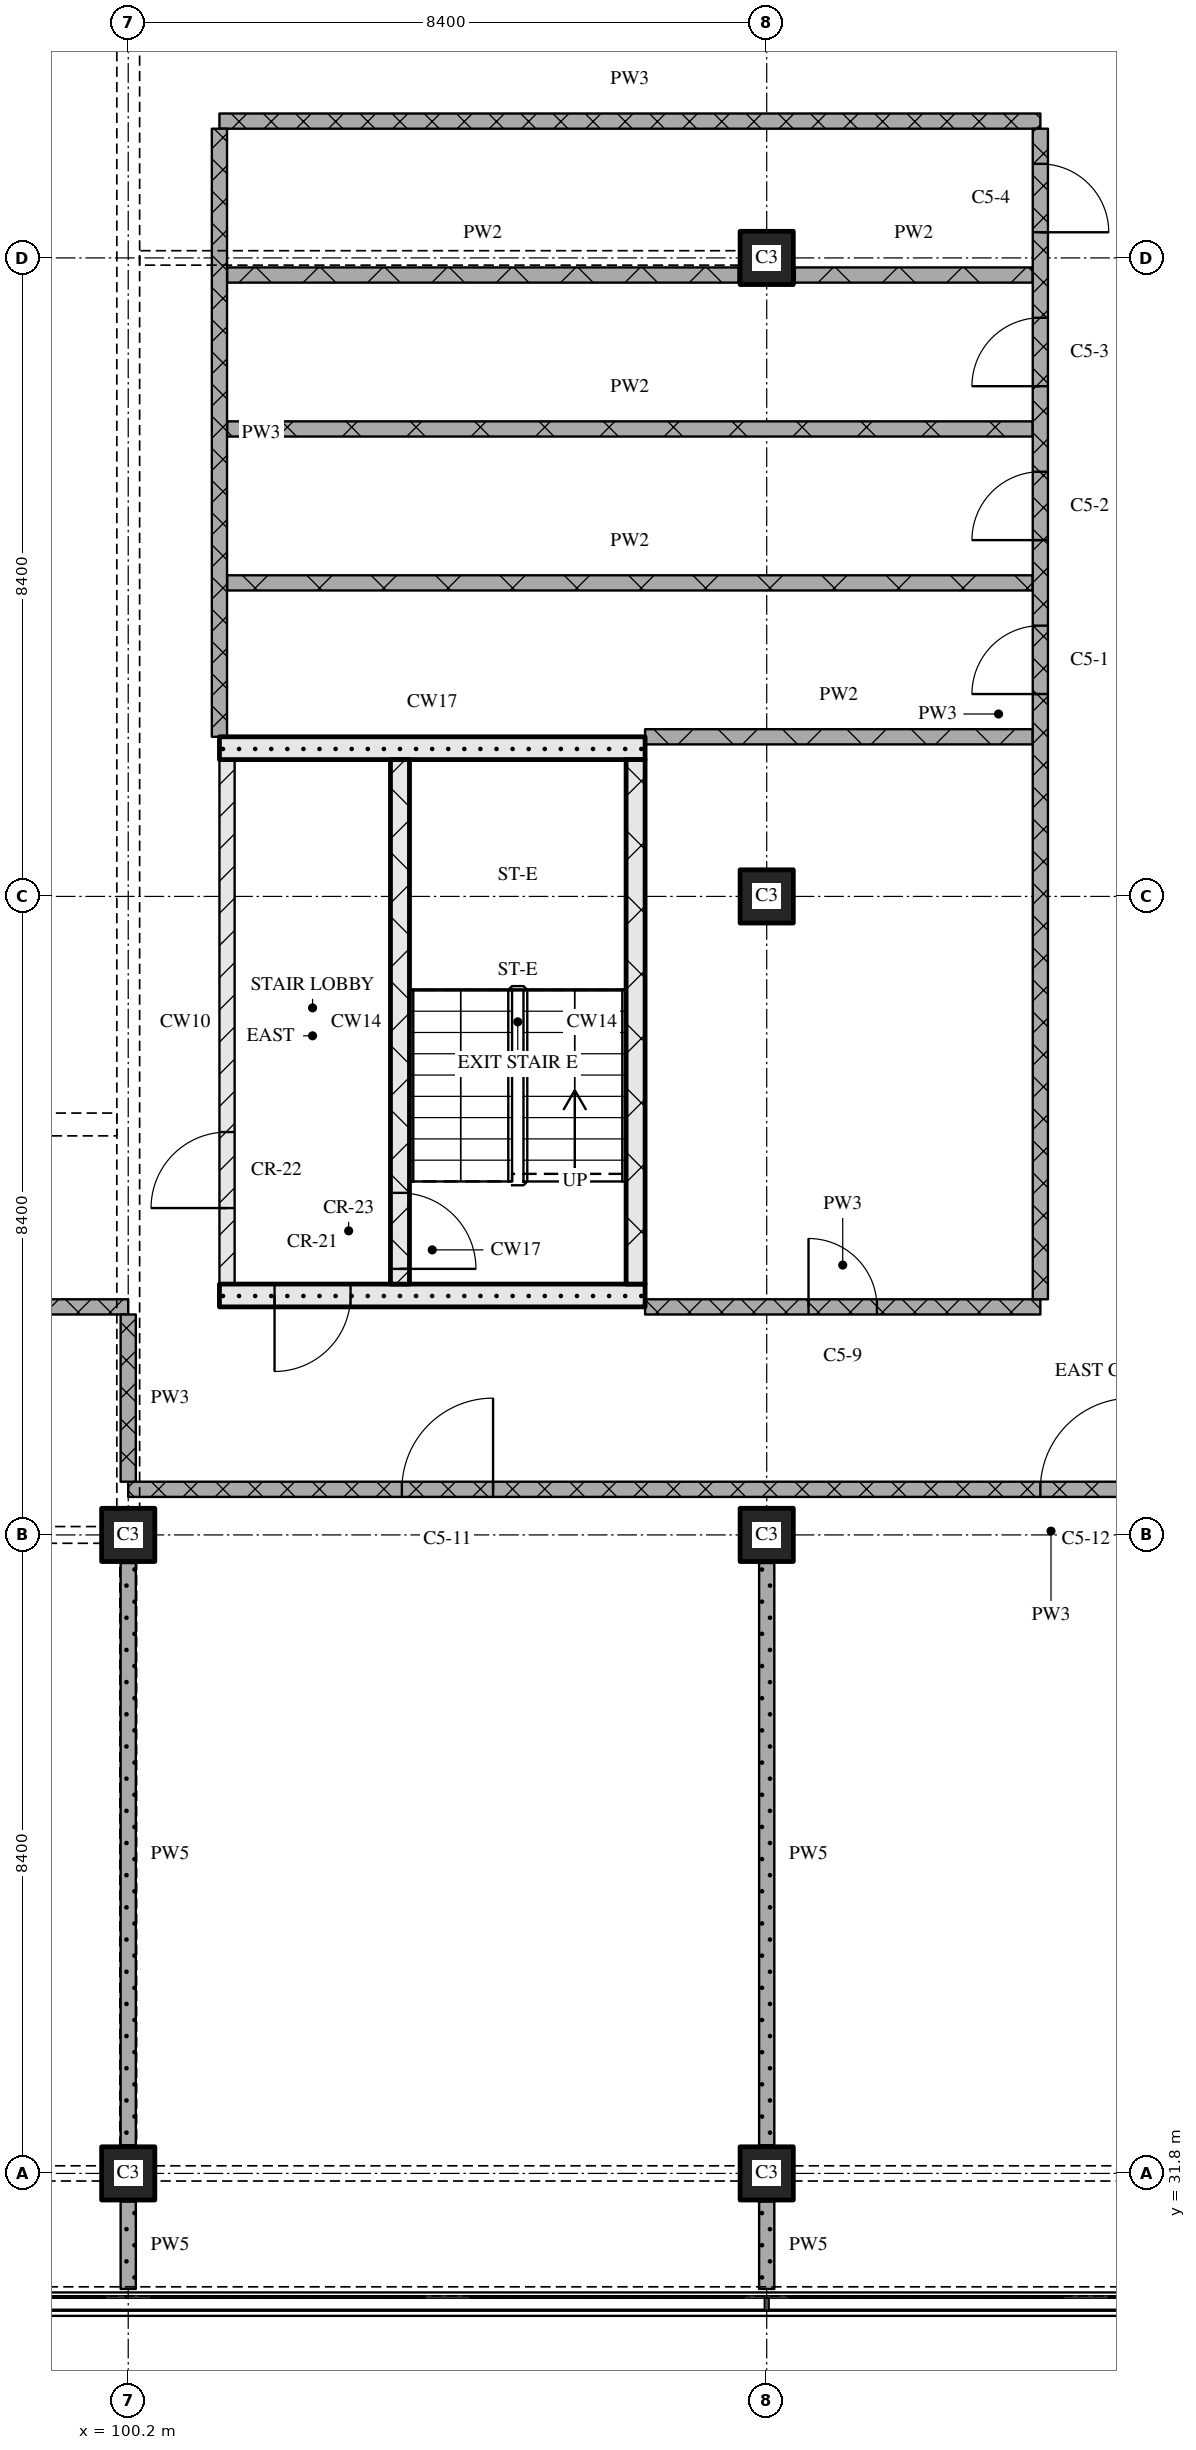
"""IFC4 building model, lengths in metres.
Left out: names, types, materials, properties, quantities, classifications, styles, units other than length and angle.
Written with IfcOpenShell. Run it as: python <this file> out.ifc"""

import sys

from ifc_helpers import new_model, si_unit, direction, frame, frame_2d, origin, origin_2d, place, context, subcontext, project, spatial, rectangle, extrude, element, fill, save


model = new_model("IFC4")
c1 = context("Model", 3, precision=1e-05, world=origin(), true_north=direction((0.0, 1.0)))
c2 = subcontext(c1, "Body", "Model", "MODEL_VIEW")
j1 = project(units=[si_unit("LENGTHUNIT", "METRE"), si_unit("PLANEANGLEUNIT", "RADIAN")], contexts=[c1])
p1 = place(None, origin())
s1 = spatial("IfcSite", under=j1, at=p1, CompositionType="ELEMENT")
p2 = place(p1, origin())
s2 = spatial("IfcBuilding", under=s1, at=p2, CompositionType="ELEMENT")
p3 = place(p2, frame((0.0, 0.0, 190.65)))
s3 = spatial("IfcBuildingStorey", under=s2, at=p3, CompositionType="ELEMENT", Elevation=190.65)
for number, where, z_axis, x_axis in (
    (1, (100.2, 31.8, 0.0), (0.0, 0.0, 1.0), (1.0, 0.0, 0.0)),
    (2, (100.2, 40.2, 0.0), (0.0, 0.0, 1.0), (1.0, 0.0, 0.0)),
    (3, (108.6, 31.8, 0.0), (0.0, 0.0, 1.0), (1.0, 0.0, 0.0)),
    (4, (108.6, 40.2, 0.0), (0.0, 0.0, 1.0), (1.0, 0.0, 0.0)),
    (5, (108.6, 48.6, 0.0), (0.0, 0.0, 1.0), (1.0, 0.0, 0.0)),
    (6, (108.6, 57.0, 0.0), (0.0, 0.0, 1.0), (1.0, 0.0, 0.0)),
):
    element("IfcColumn", number, at=place(p3, frame(where, z_axis=z_axis, x_axis=x_axis)), inside=s3, PredefinedType="COLUMN", context=c2, shape_type="SweptSolid", body=[
        extrude(rectangle(XDim=0.7, YDim=0.7, at=origin_2d()), origin(), (0.0, 0.0, 1.0), 3.6),
    ])
p4 = place(p3, frame((101.4, 43.35, 0.0), z_axis=(0.0, 0.0, 1.0), x_axis=(1.0, 0.0, 0.0)))
e7 = element("IfcWall", 7, at=p4, inside=s3, PredefinedType="SOLIDWALL", context=c2, shape_type="SweptSolid", body=[
    extrude(rectangle(XDim=5.6, YDim=0.3, at=frame_2d((2.8, 0.0))), origin(), (0.0, 0.0, 1.0), 3.3),
])
p5 = place(p4, frame((0.725, 0.0, 0.0)))
e8 = element("IfcOpeningElement", 8, at=p5, cuts=e7, PredefinedType="OPENING", context=c2, shape_type="SweptSolid", body=[
    extrude(rectangle(XDim=1.0, YDim=2.1, at=frame_2d((0.5, 1.05))), frame((0.0, 0.16, 0.0), z_axis=(0.0, -1.0, 0.0), x_axis=(1.0, 0.0, 0.0)), (0.0, 0.0, 1.0), 0.32),
])
p6 = place(p3, frame((101.5, 43.5, 0.0), z_axis=(0.0, 0.0, 1.0), x_axis=(0.0, 1.0, 0.0)))
e9 = element("IfcWall", 9, at=p6, inside=s3, PredefinedType="PARTITIONING", context=c2, shape_type="SweptSolid", body=[
    extrude(rectangle(XDim=6.9, YDim=0.2, at=frame_2d((3.45, 0.0))), origin(), (0.0, 0.0, 1.0), 3.3),
])
p7 = place(p6, frame((1.0, 0.0, 0.0)))
e10 = element("IfcOpeningElement", 10, at=p7, cuts=e9, PredefinedType="OPENING", context=c2, shape_type="SweptSolid", body=[
    extrude(rectangle(XDim=1.0, YDim=2.1, at=frame_2d((0.5, 1.05))), frame((0.0, 0.11, 0.0), z_axis=(0.0, -1.0, 0.0), x_axis=(1.0, 0.0, 0.0)), (0.0, 0.0, 1.0), 0.22),
])
p8 = place(p3, frame((103.775, 43.5, 0.0), z_axis=(0.0, 0.0, 1.0), x_axis=(0.0, 1.0, 0.0)))
e11 = element("IfcWall", 11, at=p8, inside=s3, PredefinedType="SOLIDWALL", context=c2, shape_type="SweptSolid", body=[
    extrude(rectangle(XDim=6.9, YDim=0.25, at=frame_2d((3.45, 0.0))), origin(), (0.0, 0.0, 1.0), 3.3),
])
p9 = place(p8, frame((0.2, 0.0, 0.0)))
e12 = element("IfcOpeningElement", 12, at=p9, cuts=e11, PredefinedType="OPENING", context=c2, shape_type="SweptSolid", body=[
    extrude(rectangle(XDim=1.0, YDim=2.1, at=frame_2d((0.5, 1.05))), frame((0.0, 0.135, 0.0), z_axis=(0.0, -1.0, 0.0), x_axis=(1.0, 0.0, 0.0)), (0.0, 0.0, 1.0), 0.27),
])
p10 = place(p3, frame((106.875, 43.5, 0.0), z_axis=(0.0, 0.0, 1.0), x_axis=(0.0, 1.0, 0.0)))
e13 = element("IfcWall", 13, at=p10, inside=s3, PredefinedType="SOLIDWALL", context=c2, shape_type="SweptSolid", body=[
    extrude(rectangle(XDim=6.9, YDim=0.25, at=frame_2d((3.45, 0.0))), origin(), (0.0, 0.0, 1.0), 3.3),
])
p11 = place(p3, frame((101.4, 50.55, 0.0), z_axis=(0.0, 0.0, 1.0), x_axis=(1.0, 0.0, 0.0)))
e14 = element("IfcWall", 14, at=p11, inside=s3, PredefinedType="SOLIDWALL", context=c2, shape_type="SweptSolid", body=[
    extrude(rectangle(XDim=5.6, YDim=0.3, at=frame_2d((2.8, 0.0))), origin(), (0.0, 0.0, 1.0), 3.3),
])
p12 = place(p3, frame((124.48, 40.8, 0.0), z_axis=(0.0, 0.0, 1.0), x_axis=(-1.0, 0.0, 0.0)))
e15 = element("IfcWall", 15, at=p12, inside=s3, PredefinedType="PARTITIONING", context=c2, shape_type="SweptSolid", body=[
    extrude(rectangle(XDim=24.28, YDim=0.2, at=frame_2d((12.14, 0.0))), origin(), (0.0, 0.0, 1.0), 3.3),
])
p13 = place(p12, frame((2.352, 0.0, 0.0)))
e16 = element("IfcOpeningElement", 16, at=p13, cuts=e15, PredefinedType="OPENING", context=c2, shape_type="SweptSolid", body=[
    extrude(rectangle(XDim=1.2, YDim=2.1, at=frame_2d((0.6, 1.05))), frame((0.0, 0.11, 0.0), z_axis=(0.0, -1.0, 0.0), x_axis=(1.0, 0.0, 0.0)), (0.0, 0.0, 1.0), 0.22),
])
p14 = place(p12, frame((11.08, 0.0, 0.0)))
e17 = element("IfcOpeningElement", 17, at=p14, cuts=e15, PredefinedType="OPENING", context=c2, shape_type="SweptSolid", body=[
    extrude(rectangle(XDim=1.2, YDim=2.1, at=frame_2d((0.6, 1.05))), frame((0.0, 0.11, 0.0), z_axis=(0.0, -1.0, 0.0), x_axis=(1.0, 0.0, 0.0)), (0.0, 0.0, 1.0), 0.22),
])
p15 = place(p12, frame((19.48, 0.0, 0.0)))
e18 = element("IfcOpeningElement", 18, at=p15, cuts=e15, PredefinedType="OPENING", context=c2, shape_type="SweptSolid", body=[
    extrude(rectangle(XDim=1.2, YDim=2.1, at=frame_2d((0.6, 1.05))), frame((0.0, 0.11, 0.0), z_axis=(0.0, -1.0, 0.0), x_axis=(1.0, 0.0, 0.0)), (0.0, 0.0, 1.0), 0.22),
])
p16 = place(p3, frame((100.2, 43.2, 0.0), z_axis=(0.0, 0.0, 1.0), x_axis=(-1.0, 0.0, 0.0)))
e19 = element("IfcWall", 19, at=p16, inside=s3, PredefinedType="PARTITIONING", context=c2, shape_type="SweptSolid", body=[
    extrude(rectangle(XDim=25.2, YDim=0.2, at=frame_2d((12.6, 0.0))), origin(), (0.0, 0.0, 1.0), 3.3),
])
p17 = place(p16, frame((3.6, 0.0, 0.0)))
e20 = element("IfcOpeningElement", 20, at=p17, cuts=e19, PredefinedType="OPENING", context=c2, shape_type="SweptSolid", body=[
    extrude(rectangle(XDim=1.2, YDim=2.1, at=frame_2d((0.6, 1.05))), frame((0.0, 0.11, 0.0), z_axis=(0.0, -1.0, 0.0), x_axis=(1.0, 0.0, 0.0)), (0.0, 0.0, 1.0), 0.22),
])
p18 = place(p16, frame((16.2, 0.0, 0.0)))
e21 = element("IfcOpeningElement", 21, at=p18, cuts=e19, PredefinedType="OPENING", context=c2, shape_type="SweptSolid", body=[
    extrude(rectangle(XDim=1.2, YDim=2.1, at=frame_2d((0.6, 1.05))), frame((0.0, 0.11, 0.0), z_axis=(0.0, -1.0, 0.0), x_axis=(1.0, 0.0, 0.0)), (0.0, 0.0, 1.0), 0.22),
])
p19 = place(p3, frame((107.0, 43.2, 0.0), z_axis=(0.0, 0.0, 1.0), x_axis=(1.0, 0.0, 0.0)))
e22 = element("IfcWall", 22, at=p19, inside=s3, PredefinedType="PARTITIONING", context=c2, shape_type="SweptSolid", body=[
    extrude(rectangle(XDim=5.2, YDim=0.2, at=frame_2d((2.6, 0.0))), origin(), (0.0, 0.0, 1.0), 3.3),
])
p20 = place(p19, frame((2.15, 0.0, 0.0)))
e23 = element("IfcOpeningElement", 23, at=p20, cuts=e22, PredefinedType="OPENING", context=c2, shape_type="SweptSolid", body=[
    extrude(rectangle(XDim=0.9, YDim=2.1, at=frame_2d((0.45, 1.05))), frame((0.0, 0.11, 0.0), z_axis=(0.0, -1.0, 0.0), x_axis=(1.0, 0.0, 0.0)), (0.0, 0.0, 1.0), 0.22),
])
p21 = place(p3, frame((107.0, 50.7, 0.0), z_axis=(0.0, 0.0, 1.0), x_axis=(1.0, 0.0, 0.0)))
e24 = element("IfcWall", 24, at=p21, inside=s3, PredefinedType="PARTITIONING", context=c2, shape_type="SweptSolid", body=[
    extrude(rectangle(XDim=5.1, YDim=0.2, at=frame_2d((2.55, 0.0))), origin(), (0.0, 0.0, 1.0), 3.3),
])
for number, where, z_axis, x_axis in (
    (25, (101.5, 52.725, 0.0), (0.0, 0.0, 1.0), (1.0, 0.0, 0.0)),
    (26, (101.5, 54.75, 0.0), (0.0, 0.0, 1.0), (1.0, 0.0, 0.0)),
):
    element("IfcWall", number, at=place(p3, frame(where, z_axis=z_axis, x_axis=x_axis)), inside=s3, PredefinedType="PARTITIONING", context=c2, shape_type="SweptSolid", body=[
        extrude(rectangle(XDim=10.6, YDim=0.2, at=frame_2d((5.3, 0.0))), origin(), (0.0, 0.0, 1.0), 3.3),
    ])
p22 = place(p3, frame((101.5, 56.775, 0.0), z_axis=(0.0, 0.0, 1.0), x_axis=(1.0, 0.0, 0.0)))
e27 = element("IfcWall", 27, at=p22, inside=s3, PredefinedType="PARTITIONING", context=c2, shape_type="SweptSolid", body=[
    extrude(rectangle(XDim=6.73, YDim=0.2, at=frame_2d((3.365, 0.0))), origin(), (0.0, 0.0, 1.0), 3.3),
])
p23 = place(p3, frame((108.97, 56.775, 0.0), z_axis=(0.0, 0.0, 1.0), x_axis=(1.0, 0.0, 0.0)))
e28 = element("IfcWall", 28, at=p23, inside=s3, PredefinedType="PARTITIONING", context=c2, shape_type="SweptSolid", body=[
    extrude(rectangle(XDim=3.13, YDim=0.2, at=frame_2d((1.565, 0.0))), origin(), (0.0, 0.0, 1.0), 3.3),
])
p24 = place(p3, frame((101.4, 58.8, 0.0), z_axis=(0.0, 0.0, 1.0), x_axis=(1.0, 0.0, 0.0)))
e29 = element("IfcWall", 29, at=p24, inside=s3, PredefinedType="PARTITIONING", context=c2, shape_type="SweptSolid", body=[
    extrude(rectangle(XDim=10.8, YDim=0.2, at=frame_2d((5.4, 0.0))), origin(), (0.0, 0.0, 1.0), 3.3),
])
p25 = place(p3, frame((100.2, 43.1, 0.0), z_axis=(0.0, 0.0, 1.0), x_axis=(0.0, -1.0, 0.0)))
e30 = element("IfcWall", 30, at=p25, inside=s3, PredefinedType="PARTITIONING", context=c2, shape_type="SweptSolid", body=[
    extrude(rectangle(XDim=2.2, YDim=0.2, at=frame_2d((1.1, 0.0))), origin(), (0.0, 0.0, 1.0), 2.41),
])
p26 = place(p3, frame((100.2, 31.43, 0.0), z_axis=(0.0, 0.0, 1.0), x_axis=(0.0, -1.0, 0.0)))
e31 = element("IfcWall", 31, at=p26, inside=s3, PredefinedType="PARTITIONING", context=c2, shape_type="SweptSolid", body=[
    extrude(rectangle(XDim=1.15, YDim=0.2, at=frame_2d((0.575, 0.0))), origin(), (0.0, 0.0, 1.0), 2.41),
])
p27 = place(p3, frame((100.2, 39.83, 0.0), z_axis=(0.0, 0.0, 1.0), x_axis=(0.0, -1.0, 0.0)))
e32 = element("IfcWall", 32, at=p27, inside=s3, PredefinedType="PARTITIONING", context=c2, shape_type="SweptSolid", body=[
    extrude(rectangle(XDim=7.66, YDim=0.2, at=frame_2d((3.83, 0.0))), origin(), (0.0, 0.0, 1.0), 2.7),
])
p28 = place(p3, frame((101.4, 58.7, 0.0), z_axis=(0.0, 0.0, 1.0), x_axis=(0.0, -1.0, 0.0)))
e33 = element("IfcWall", 33, at=p28, inside=s3, PredefinedType="PARTITIONING", context=c2, shape_type="SweptSolid", body=[
    extrude(rectangle(XDim=8.0, YDim=0.2, at=frame_2d((4.0, 0.0))), origin(), (0.0, 0.0, 1.0), 3.3),
])
p29 = place(p3, frame((108.6, 31.43, 0.0), z_axis=(0.0, 0.0, 1.0), x_axis=(0.0, -1.0, 0.0)))
e34 = element("IfcWall", 34, at=p29, inside=s3, PredefinedType="PARTITIONING", context=c2, shape_type="SweptSolid", body=[
    extrude(rectangle(XDim=1.15, YDim=0.2, at=frame_2d((0.575, 0.0))), origin(), (0.0, 0.0, 1.0), 3.3),
])
p30 = place(p3, frame((108.6, 39.83, 0.0), z_axis=(0.0, 0.0, 1.0), x_axis=(0.0, -1.0, 0.0)))
e35 = element("IfcWall", 35, at=p30, inside=s3, PredefinedType="PARTITIONING", context=c2, shape_type="SweptSolid", body=[
    extrude(rectangle(XDim=7.66, YDim=0.2, at=frame_2d((3.83, 0.0))), origin(), (0.0, 0.0, 1.0), 3.3),
])
p31 = place(p3, frame((112.2, 43.3, 0.0), z_axis=(0.0, 0.0, 1.0), x_axis=(0.0, 1.0, 0.0)))
e36 = element("IfcWall", 36, at=p31, inside=s3, PredefinedType="PARTITIONING", context=c2, shape_type="SweptSolid", body=[
    extrude(rectangle(XDim=15.4, YDim=0.2, at=frame_2d((7.7, 0.0))), origin(), (0.0, 0.0, 1.0), 3.3),
])
p32 = place(p31, frame((7.962, 0.0, 0.0)))
e37 = element("IfcOpeningElement", 37, at=p32, cuts=e36, PredefinedType="OPENING", context=c2, shape_type="SweptSolid", body=[
    extrude(rectangle(XDim=0.9, YDim=2.1, at=frame_2d((0.45, 1.05))), frame((0.0, 0.11, 0.0), z_axis=(0.0, -1.0, 0.0), x_axis=(1.0, 0.0, 0.0)), (0.0, 0.0, 1.0), 0.22),
])
p33 = place(p31, frame((9.988, 0.0, 0.0)))
e38 = element("IfcOpeningElement", 38, at=p33, cuts=e36, PredefinedType="OPENING", context=c2, shape_type="SweptSolid", body=[
    extrude(rectangle(XDim=0.9, YDim=2.1, at=frame_2d((0.45, 1.05))), frame((0.0, 0.11, 0.0), z_axis=(0.0, -1.0, 0.0), x_axis=(1.0, 0.0, 0.0)), (0.0, 0.0, 1.0), 0.22),
])
p34 = place(p31, frame((12.012, 0.0, 0.0)))
e39 = element("IfcOpeningElement", 39, at=p34, cuts=e36, PredefinedType="OPENING", context=c2, shape_type="SweptSolid", body=[
    extrude(rectangle(XDim=0.9, YDim=2.1, at=frame_2d((0.45, 1.05))), frame((0.0, 0.11, 0.0), z_axis=(0.0, -1.0, 0.0), x_axis=(1.0, 0.0, 0.0)), (0.0, 0.0, 1.0), 0.22),
])
p35 = place(p31, frame((14.038, 0.0, 0.0)))
e40 = element("IfcOpeningElement", 40, at=p35, cuts=e36, PredefinedType="OPENING", context=c2, shape_type="SweptSolid", body=[
    extrude(rectangle(XDim=0.9, YDim=2.1, at=frame_2d((0.45, 1.05))), frame((0.0, 0.11, 0.0), z_axis=(0.0, -1.0, 0.0), x_axis=(1.0, 0.0, 0.0)), (0.0, 0.0, 1.0), 0.22),
])
p36 = place(p5, origin())
e41 = element("IfcDoor", 41, at=p36, inside=s3, OperationType="SINGLE_SWING_RIGHT", PredefinedType="DOOR", context=c2, shape_type="SweptSolid", body=[
    extrude(rectangle(XDim=1.0, YDim=2.1, at=frame_2d((0.5, 1.05))), frame((0.0, 0.025, 0.0), z_axis=(0.0, -1.0, 0.0), x_axis=(1.0, 0.0, 0.0)), (0.0, 0.0, 1.0), 0.05),
])
fill(e8, e41)
p37 = place(p9, origin())
e42 = element("IfcDoor", 42, at=p37, inside=s3, OperationType="SINGLE_SWING_RIGHT", PredefinedType="DOOR", context=c2, shape_type="SweptSolid", body=[
    extrude(rectangle(XDim=1.0, YDim=2.1, at=frame_2d((0.5, 1.05))), frame((0.0, 0.025, 0.0), z_axis=(0.0, -1.0, 0.0), x_axis=(1.0, 0.0, 0.0)), (0.0, 0.0, 1.0), 0.05),
])
fill(e12, e42)
p38 = place(p7, origin())
e43 = element("IfcDoor", 43, at=p38, inside=s3, OperationType="SINGLE_SWING_LEFT", PredefinedType="DOOR", context=c2, shape_type="SweptSolid", body=[
    extrude(rectangle(XDim=1.0, YDim=2.1, at=frame_2d((0.5, 1.05))), frame((0.0, 0.025, 0.0), z_axis=(0.0, -1.0, 0.0), x_axis=(1.0, 0.0, 0.0)), (0.0, 0.0, 1.0), 0.05),
])
fill(e10, e43)
p39 = place(p14, origin())
e44 = element("IfcDoor", 44, at=p39, inside=s3, OperationType="SINGLE_SWING_RIGHT", PredefinedType="DOOR", context=c2, shape_type="SweptSolid", body=[
    extrude(rectangle(XDim=1.2, YDim=2.1, at=frame_2d((0.6, 1.05))), frame((0.0, 0.025, 0.0), z_axis=(0.0, -1.0, 0.0), x_axis=(1.0, 0.0, 0.0)), (0.0, 0.0, 1.0), 0.05),
])
fill(e17, e44)
p40 = place(p15, origin())
e45 = element("IfcDoor", 45, at=p40, inside=s3, OperationType="SINGLE_SWING_RIGHT", PredefinedType="DOOR", context=c2, shape_type="SweptSolid", body=[
    extrude(rectangle(XDim=1.2, YDim=2.1, at=frame_2d((0.6, 1.05))), frame((0.0, 0.025, 0.0), z_axis=(0.0, -1.0, 0.0), x_axis=(1.0, 0.0, 0.0)), (0.0, 0.0, 1.0), 0.05),
])
fill(e18, e45)
p41 = place(p20, origin())
e46 = element("IfcDoor", 46, at=p41, inside=s3, OperationType="SINGLE_SWING_LEFT", PredefinedType="DOOR", context=c2, shape_type="SweptSolid", body=[
    extrude(rectangle(XDim=0.9, YDim=2.1, at=frame_2d((0.45, 1.05))), frame((0.0, 0.025, 0.0), z_axis=(0.0, -1.0, 0.0), x_axis=(1.0, 0.0, 0.0)), (0.0, 0.0, 1.0), 0.05),
])
fill(e23, e46)
p42 = place(p32, origin())
e47 = element("IfcDoor", 47, at=p42, inside=s3, OperationType="SINGLE_SWING_LEFT", PredefinedType="DOOR", context=c2, shape_type="SweptSolid", body=[
    extrude(rectangle(XDim=0.9, YDim=2.1, at=frame_2d((0.45, 1.05))), frame((0.0, 0.025, 0.0), z_axis=(0.0, -1.0, 0.0), x_axis=(1.0, 0.0, 0.0)), (0.0, 0.0, 1.0), 0.05),
])
fill(e37, e47)
p43 = place(p33, origin())
e48 = element("IfcDoor", 48, at=p43, inside=s3, OperationType="SINGLE_SWING_LEFT", PredefinedType="DOOR", context=c2, shape_type="SweptSolid", body=[
    extrude(rectangle(XDim=0.9, YDim=2.1, at=frame_2d((0.45, 1.05))), frame((0.0, 0.025, 0.0), z_axis=(0.0, -1.0, 0.0), x_axis=(1.0, 0.0, 0.0)), (0.0, 0.0, 1.0), 0.05),
])
fill(e38, e48)
p44 = place(p34, origin())
e49 = element("IfcDoor", 49, at=p44, inside=s3, OperationType="SINGLE_SWING_LEFT", PredefinedType="DOOR", context=c2, shape_type="SweptSolid", body=[
    extrude(rectangle(XDim=0.9, YDim=2.1, at=frame_2d((0.45, 1.05))), frame((0.0, 0.025, 0.0), z_axis=(0.0, -1.0, 0.0), x_axis=(1.0, 0.0, 0.0)), (0.0, 0.0, 1.0), 0.05),
])
fill(e39, e49)
p45 = place(p35, origin())
e50 = element("IfcDoor", 50, at=p45, inside=s3, OperationType="SINGLE_SWING_RIGHT", PredefinedType="DOOR", context=c2, shape_type="SweptSolid", body=[
    extrude(rectangle(XDim=0.9, YDim=2.1, at=frame_2d((0.45, 1.05))), frame((0.0, 0.025, 0.0), z_axis=(0.0, -1.0, 0.0), x_axis=(1.0, 0.0, 0.0)), (0.0, 0.0, 1.0), 0.05),
])
fill(e40, e50)
save(model, sys.argv[1])
